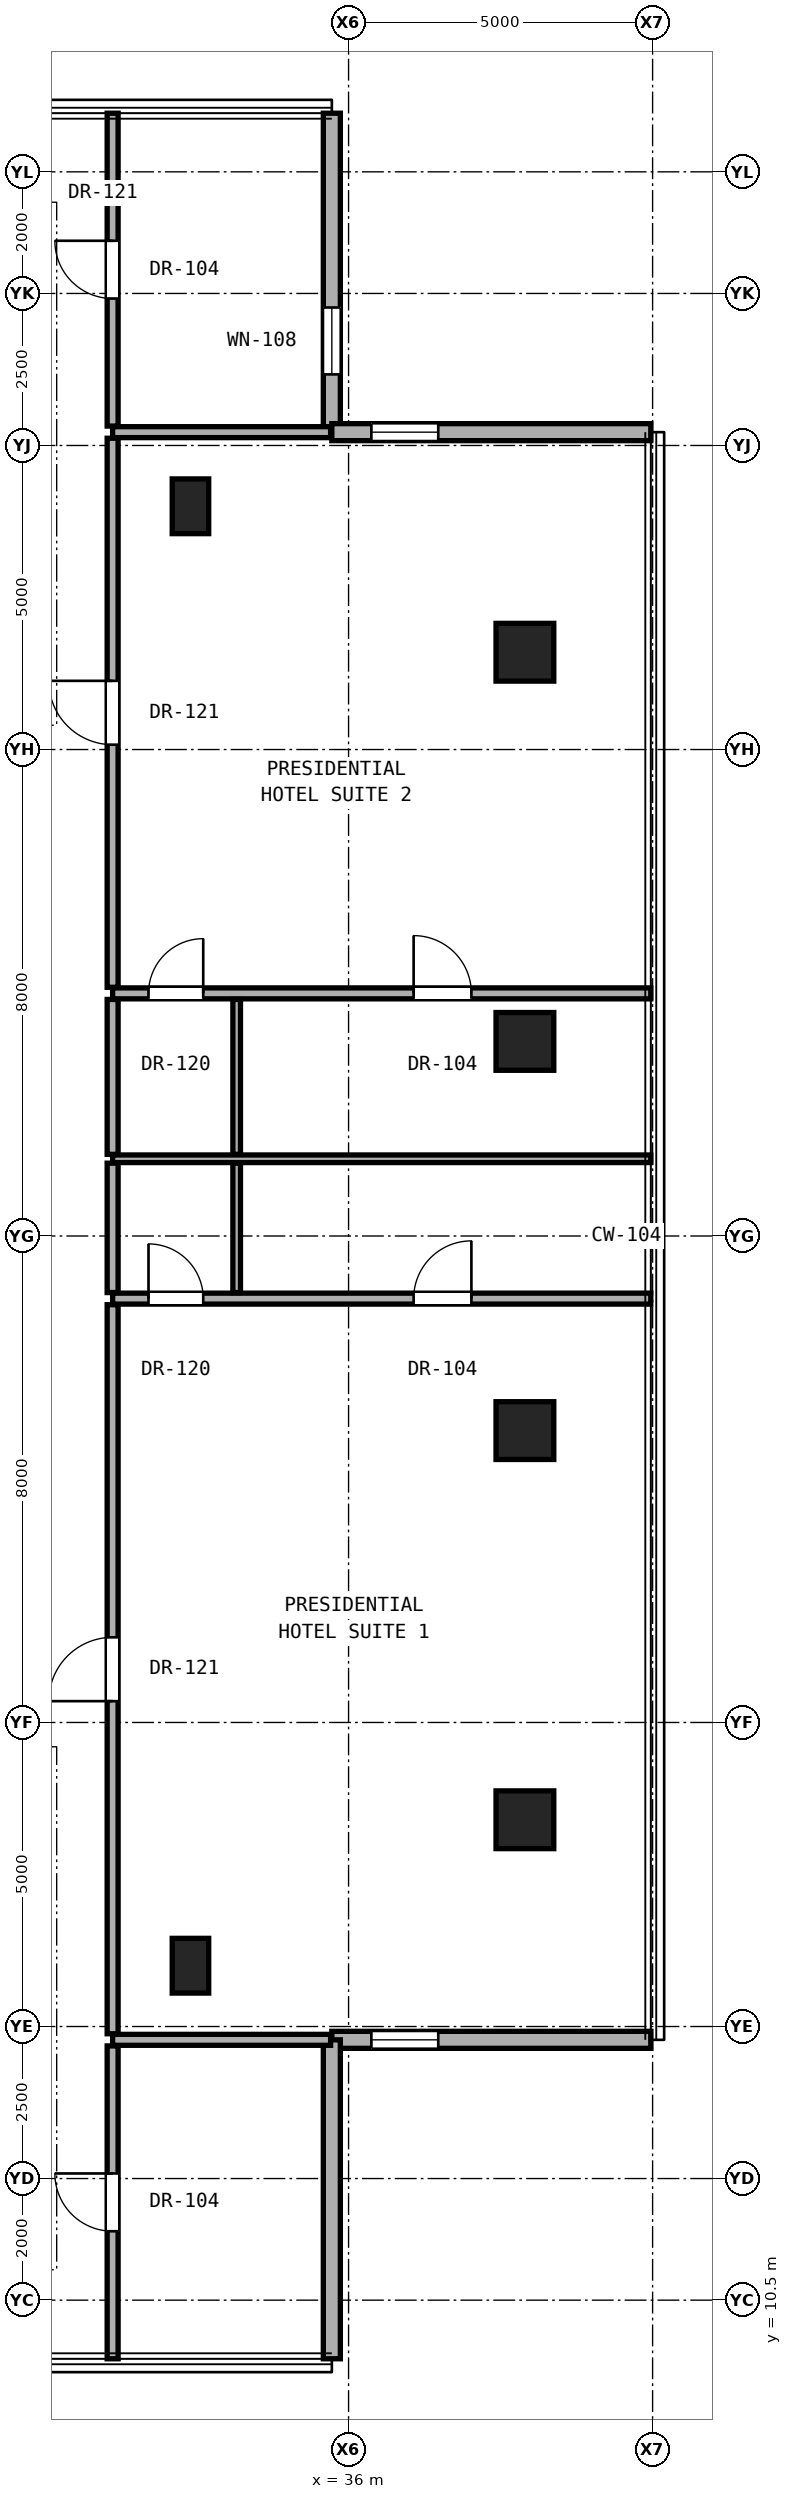
"""IFC4 building model, lengths in metres.
Left out: names, types, materials, properties, quantities, classifications, styles, units other than length and angle.
Written with IfcOpenShell. Run it as: python <this file> out.ifc"""

import sys

from ifc_helpers import new_model, si_unit, direction, frame, frame_2d, origin, origin_2d, place, context, subcontext, project, spatial, rectangle, hollow_rectangle, extrude, element, fill, save


model = new_model("IFC4")
c1 = context("Model", 3, precision=1e-05, world=origin(), true_north=direction((0.0, 1.0)))
c2 = subcontext(c1, "Body", "Model", "MODEL_VIEW")
j1 = project(units=[si_unit("LENGTHUNIT", "METRE"), si_unit("PLANEANGLEUNIT", "RADIAN")], contexts=[c1])
p1 = place(None, origin())
s1 = spatial("IfcSite", under=j1, at=p1, CompositionType="ELEMENT")
p2 = place(p1, origin())
s2 = spatial("IfcBuilding", under=s1, at=p2, CompositionType="ELEMENT")
p3 = place(p2, frame((0.0, 0.0, 164.15)))
s3 = spatial("IfcBuildingStorey", under=s2, at=p3, CompositionType="ELEMENT", Elevation=164.15)
for number, where, z_axis, x_axis in (
    (1, (38.9, 18.4, 0.0), (0.0, 0.0, 1.0), (1.0, 0.0, 0.0)),
    (2, (38.9, 24.8, 0.0), (0.0, 0.0, 1.0), (1.0, 0.0, 0.0)),
    (3, (38.9, 31.2, 0.0), (0.0, 0.0, 1.0), (1.0, 0.0, 0.0)),
    (4, (38.9, 37.6, 0.0), (0.0, 0.0, 1.0), (1.0, 0.0, 0.0)),
):
    element("IfcColumn", number, at=place(p3, frame(where, z_axis=z_axis, x_axis=x_axis)), inside=s3, PredefinedType="COLUMN", context=c2, shape_type="SweptSolid", body=[
        extrude(hollow_rectangle(XDim=0.95, YDim=0.95, WallThickness=0.05, at=origin_2d()), origin(), (0.0, 0.0, 1.0), 3.25),
    ])
for number, where, z_axis, x_axis in (
    (5, (33.4, 16.0, 0.0), (0.0, 0.0, 1.0), (1.0, 0.0, 0.0)),
    (6, (33.4, 40.0, 0.0), (0.0, 0.0, 1.0), (1.0, 0.0, 0.0)),
):
    element("IfcColumn", number, at=place(p3, frame(where, z_axis=z_axis, x_axis=x_axis)), inside=s3, PredefinedType="PILASTER", context=c2, shape_type="SweptSolid", body=[
        extrude(rectangle(XDim=0.6, YDim=0.9, at=origin_2d()), origin(), (0.0, 0.0, 1.0), 3.25),
    ])
p4 = place(p3, frame((35.725, 41.219, 0.0), z_axis=(0.0, 0.0, 1.0), x_axis=(0.0, 1.0, 0.0)))
e7 = element("IfcWall", 7, at=p4, inside=s3, PredefinedType="SOLIDWALL", context=c2, shape_type="SweptSolid", body=[
    extrude(rectangle(XDim=5.245, YDim=0.28, at=frame_2d((2.623, 0.0))), origin(), (0.0, 0.0, 1.0), 3.03),
])
p5 = place(p4, frame((0.95, 0.0, 0.85)))
e8 = element("IfcOpeningElement", 8, at=p5, cuts=e7, PredefinedType="OPENING", context=c2, shape_type="SweptSolid", body=[
    extrude(rectangle(XDim=1.1, YDim=2.0, at=frame_2d((0.55, 1.0))), frame((0.0, 0.15, 0.0), z_axis=(0.0, -1.0, 0.0), x_axis=(1.0, 0.0, 0.0)), (0.0, 0.0, 1.0), 0.3),
])
p6 = place(p3, frame((35.725, 14.781, 0.0), z_axis=(0.0, 0.0, 1.0), x_axis=(1.0, 0.0, 0.0)))
e9 = element("IfcWall", 9, at=p6, inside=s3, PredefinedType="SOLIDWALL", context=c2, shape_type="SweptSolid", body=[
    extrude(rectangle(XDim=5.245, YDim=0.28, at=frame_2d((2.623, 0.0))), origin(), (0.0, 0.0, 1.0), 3.03),
])
p7 = place(p6, frame((0.65, 0.0, 0.85)))
e10 = element("IfcOpeningElement", 10, at=p7, cuts=e9, PredefinedType="OPENING", context=c2, shape_type="SweptSolid", body=[
    extrude(rectangle(XDim=1.1, YDim=2.0, at=frame_2d((0.55, 1.0))), frame((0.0, 0.15, 0.0), z_axis=(0.0, -1.0, 0.0), x_axis=(1.0, 0.0, 0.0)), (0.0, 0.0, 1.0), 0.3),
])
p8 = place(p3, frame((35.725, 9.536, 0.0), z_axis=(0.0, 0.0, 1.0), x_axis=(0.0, 1.0, 0.0)))
e11 = element("IfcWall", 11, at=p8, inside=s3, PredefinedType="SOLIDWALL", context=c2, shape_type="SweptSolid", body=[
    extrude(rectangle(XDim=5.245, YDim=0.28, at=frame_2d((2.623, 0.0))), origin(), (0.0, 0.0, 1.0), 3.03),
])
p9 = place(p3, frame((40.97, 41.219, 0.0), z_axis=(0.0, 0.0, 1.0), x_axis=(-1.0, 0.0, 0.0)))
e12 = element("IfcWall", 12, at=p9, inside=s3, PredefinedType="SOLIDWALL", context=c2, shape_type="SweptSolid", body=[
    extrude(rectangle(XDim=5.245, YDim=0.28, at=frame_2d((2.623, 0.0))), origin(), (0.0, 0.0, 1.0), 3.03),
])
p10 = place(p9, frame((3.495, 0.0, 0.85)))
e13 = element("IfcOpeningElement", 13, at=p10, cuts=e12, PredefinedType="OPENING", context=c2, shape_type="SweptSolid", body=[
    extrude(rectangle(XDim=1.1, YDim=2.0, at=frame_2d((0.55, 1.0))), frame((0.0, 0.15, 0.0), z_axis=(0.0, -1.0, 0.0), x_axis=(1.0, 0.0, 0.0)), (0.0, 0.0, 1.0), 0.3),
])
p11 = place(p3, frame((32.12, 14.781, 0.0), z_axis=(0.0, 0.0, 1.0), x_axis=(1.0, 0.0, 0.0)))
e14 = element("IfcWall", 14, at=p11, inside=s3, PredefinedType="PARTITIONING", context=c2, shape_type="SweptSolid", body=[
    extrude(rectangle(XDim=3.585, YDim=0.18, at=frame_2d((1.792, 0.0))), origin(), (0.0, 0.0, 1.0), 3.05),
])
p12 = place(p3, frame((32.12, 26.97, 0.0), z_axis=(0.0, 0.0, 1.0), x_axis=(1.0, 0.0, 0.0)))
e15 = element("IfcWall", 15, at=p12, inside=s3, PredefinedType="PARTITIONING", context=c2, shape_type="SweptSolid", body=[
    extrude(rectangle(XDim=8.85, YDim=0.18, at=frame_2d((4.425, 0.0))), origin(), (0.0, 0.0, 1.0), 2.269),
])
p13 = place(p12, frame((4.95, 0.0, 0.0)))
e16 = element("IfcOpeningElement", 16, at=p13, cuts=e15, PredefinedType="OPENING", context=c2, shape_type="SweptSolid", body=[
    extrude(rectangle(XDim=0.95, YDim=2.15, at=frame_2d((0.475, 1.075))), frame((0.0, 0.1, 0.0), z_axis=(0.0, -1.0, 0.0), x_axis=(1.0, 0.0, 0.0)), (0.0, 0.0, 1.0), 0.2),
])
p14 = place(p12, frame((0.59, 0.0, 0.0)))
e17 = element("IfcOpeningElement", 17, at=p14, cuts=e15, PredefinedType="OPENING", context=c2, shape_type="SweptSolid", body=[
    extrude(rectangle(XDim=0.9, YDim=2.1, at=frame_2d((0.45, 1.05))), frame((0.0, 0.1, 0.0), z_axis=(0.0, -1.0, 0.0), x_axis=(1.0, 0.0, 0.0)), (0.0, 0.0, 1.0), 0.2),
])
p15 = place(p3, frame((32.12, 29.27, 0.0), z_axis=(0.0, 0.0, 1.0), x_axis=(1.0, 0.0, 0.0)))
e18 = element("IfcWall", 18, at=p15, inside=s3, PredefinedType="PARTITIONING", context=c2, shape_type="SweptSolid", body=[
    extrude(rectangle(XDim=8.85, YDim=0.125, at=frame_2d((4.425, 0.0))), origin(), (0.0, 0.0, 1.0), 2.269),
])
p16 = place(p3, frame((32.12, 31.99, 0.0), z_axis=(0.0, 0.0, 1.0), x_axis=(1.0, 0.0, 0.0)))
e19 = element("IfcWall", 19, at=p16, inside=s3, PredefinedType="PARTITIONING", context=c2, shape_type="SweptSolid", body=[
    extrude(rectangle(XDim=8.85, YDim=0.18, at=frame_2d((4.425, 0.0))), origin(), (0.0, 0.0, 1.0), 2.269),
])
p17 = place(p16, frame((4.95, 0.0, 0.0)))
e20 = element("IfcOpeningElement", 20, at=p17, cuts=e19, PredefinedType="OPENING", context=c2, shape_type="SweptSolid", body=[
    extrude(rectangle(XDim=0.95, YDim=2.15, at=frame_2d((0.475, 1.075))), frame((0.0, 0.1, 0.0), z_axis=(0.0, -1.0, 0.0), x_axis=(1.0, 0.0, 0.0)), (0.0, 0.0, 1.0), 0.2),
])
p18 = place(p16, frame((0.59, 0.0, 0.0)))
e21 = element("IfcOpeningElement", 21, at=p18, cuts=e19, PredefinedType="OPENING", context=c2, shape_type="SweptSolid", body=[
    extrude(rectangle(XDim=0.9, YDim=2.1, at=frame_2d((0.45, 1.05))), frame((0.0, 0.1, 0.0), z_axis=(0.0, -1.0, 0.0), x_axis=(1.0, 0.0, 0.0)), (0.0, 0.0, 1.0), 0.2),
])
p19 = place(p3, frame((32.12, 41.219, 0.0), z_axis=(0.0, 0.0, 1.0), x_axis=(1.0, 0.0, 0.0)))
e22 = element("IfcWall", 22, at=p19, inside=s3, PredefinedType="PARTITIONING", context=c2, shape_type="SweptSolid", body=[
    extrude(rectangle(XDim=3.585, YDim=0.18, at=frame_2d((1.792, 0.0))), origin(), (0.0, 0.0, 1.0), 3.05),
])
p20 = place(p3, frame((32.12, 9.536, 0.0), z_axis=(0.0, 0.0, 1.0), x_axis=(0.0, 1.0, 0.0)))
e23 = element("IfcWall", 23, at=p20, inside=s3, PredefinedType="PARTITIONING", context=c2, shape_type="SweptSolid", body=[
    extrude(rectangle(XDim=5.145, YDim=0.18, at=frame_2d((2.573, 0.0))), origin(), (0.0, 0.0, 1.0), 3.05),
])
p21 = place(p20, frame((2.097, 0.0, 0.0)))
e24 = element("IfcOpeningElement", 24, at=p21, cuts=e23, PredefinedType="OPENING", context=c2, shape_type="SweptSolid", body=[
    extrude(rectangle(XDim=0.95, YDim=2.15, at=frame_2d((0.475, 1.075))), frame((0.0, 0.1, 0.0), z_axis=(0.0, -1.0, 0.0), x_axis=(1.0, 0.0, 0.0)), (0.0, 0.0, 1.0), 0.2),
])
p22 = place(p3, frame((32.12, 14.881, 0.0), z_axis=(0.0, 0.0, 1.0), x_axis=(0.0, 1.0, 0.0)))
e25 = element("IfcWall", 25, at=p22, inside=s3, PredefinedType="PARTITIONING", context=c2, shape_type="SweptSolid", body=[
    extrude(rectangle(XDim=11.989, YDim=0.18, at=frame_2d((5.995, 0.0))), origin(), (0.0, 0.0, 1.0), 2.346),
])
p23 = place(p22, frame((5.469, 0.0, 0.0)))
e26 = element("IfcOpeningElement", 26, at=p23, cuts=e25, PredefinedType="OPENING", context=c2, shape_type="SweptSolid", body=[
    extrude(rectangle(XDim=1.05, YDim=2.2, at=frame_2d((0.525, 1.1))), frame((0.0, 0.1, 0.0), z_axis=(0.0, -1.0, 0.0), x_axis=(1.0, 0.0, 0.0)), (0.0, 0.0, 1.0), 0.2),
])
p24 = place(p3, frame((32.12, 27.07, 0.0), z_axis=(0.0, 0.0, 1.0), x_axis=(0.0, 1.0, 0.0)))
e27 = element("IfcWall", 27, at=p24, inside=s3, PredefinedType="PARTITIONING", context=c2, shape_type="SweptSolid", body=[
    extrude(rectangle(XDim=2.127, YDim=0.18, at=frame_2d((1.064, 0.0))), origin(), (0.0, 0.0, 1.0), 3.05),
])
p25 = place(p3, frame((32.12, 29.343, 0.0), z_axis=(0.0, 0.0, 1.0), x_axis=(0.0, 1.0, 0.0)))
e28 = element("IfcWall", 28, at=p25, inside=s3, PredefinedType="PARTITIONING", context=c2, shape_type="SweptSolid", body=[
    extrude(rectangle(XDim=2.547, YDim=0.18, at=frame_2d((1.274, 0.0))), origin(), (0.0, 0.0, 1.0), 2.346),
])
p26 = place(p3, frame((32.12, 32.09, 0.0), z_axis=(0.0, 0.0, 1.0), x_axis=(0.0, 1.0, 0.0)))
e29 = element("IfcWall", 29, at=p26, inside=s3, PredefinedType="PARTITIONING", context=c2, shape_type="SweptSolid", body=[
    extrude(rectangle(XDim=9.029, YDim=0.18, at=frame_2d((4.514, 0.0))), origin(), (0.0, 0.0, 1.0), 2.442),
])
p27 = place(p26, frame((3.99, 0.0, 0.0)))
e30 = element("IfcOpeningElement", 30, at=p27, cuts=e29, PredefinedType="OPENING", context=c2, shape_type="SweptSolid", body=[
    extrude(rectangle(XDim=1.05, YDim=2.2, at=frame_2d((0.525, 1.1))), frame((0.0, 0.1, 0.0), z_axis=(0.0, -1.0, 0.0), x_axis=(1.0, 0.0, 0.0)), (0.0, 0.0, 1.0), 0.2),
])
p28 = place(p3, frame((32.12, 41.319, 0.0), z_axis=(0.0, 0.0, 1.0), x_axis=(0.0, 1.0, 0.0)))
e31 = element("IfcWall", 31, at=p28, inside=s3, PredefinedType="PARTITIONING", context=c2, shape_type="SweptSolid", body=[
    extrude(rectangle(XDim=5.145, YDim=0.18, at=frame_2d((2.573, 0.0))), origin(), (0.0, 0.0, 1.0), 3.05),
])
p29 = place(p28, frame((2.097, 0.0, 0.0)))
e32 = element("IfcOpeningElement", 32, at=p29, cuts=e31, PredefinedType="OPENING", context=c2, shape_type="SweptSolid", body=[
    extrude(rectangle(XDim=0.95, YDim=2.15, at=frame_2d((0.475, 1.075))), frame((0.0, 0.1, 0.0), z_axis=(0.0, -1.0, 0.0), x_axis=(1.0, 0.0, 0.0)), (0.0, 0.0, 1.0), 0.2),
])
p30 = place(p3, frame((34.16, 27.07, 0.0), z_axis=(0.0, 0.0, 1.0), x_axis=(0.0, 1.0, 0.0)))
e33 = element("IfcWall", 33, at=p30, inside=s3, PredefinedType="PARTITIONING", context=c2, shape_type="SweptSolid", body=[
    extrude(rectangle(XDim=2.127, YDim=0.125, at=frame_2d((1.064, 0.0))), origin(), (0.0, 0.0, 1.0), 3.05),
])
p31 = place(p3, frame((34.16, 29.343, 0.0), z_axis=(0.0, 0.0, 1.0), x_axis=(0.0, 1.0, 0.0)))
e34 = element("IfcWall", 34, at=p31, inside=s3, PredefinedType="PARTITIONING", context=c2, shape_type="SweptSolid", body=[
    extrude(rectangle(XDim=2.547, YDim=0.125, at=frame_2d((1.274, 0.0))), origin(), (0.0, 0.0, 1.0), 2.346),
])
p32 = place(p5, origin())
e35 = element("IfcWindow", 35, at=p32, inside=s3, PartitioningType="SINGLE_PANEL", PredefinedType="WINDOW", context=c2, shape_type="SweptSolid", body=[
    extrude(rectangle(XDim=1.1, YDim=2.0, at=frame_2d((0.55, 1.0))), frame((0.0, 0.03, 0.0), z_axis=(0.0, -1.0, 0.0), x_axis=(1.0, 0.0, 0.0)), (0.0, 0.0, 1.0), 0.06),
])
fill(e8, e35)
p33 = place(p7, origin())
e36 = element("IfcWindow", 36, at=p33, inside=s3, PartitioningType="SINGLE_PANEL", PredefinedType="WINDOW", context=c2, shape_type="SweptSolid", body=[
    extrude(rectangle(XDim=1.1, YDim=2.0, at=frame_2d((0.55, 1.0))), frame((0.0, 0.03, 0.0), z_axis=(0.0, -1.0, 0.0), x_axis=(1.0, 0.0, 0.0)), (0.0, 0.0, 1.0), 0.06),
])
fill(e10, e36)
p34 = place(p10, origin())
e37 = element("IfcWindow", 37, at=p34, inside=s3, PartitioningType="SINGLE_PANEL", PredefinedType="WINDOW", context=c2, shape_type="SweptSolid", body=[
    extrude(rectangle(XDim=1.1, YDim=2.0, at=frame_2d((0.55, 1.0))), frame((0.0, 0.03, 0.0), z_axis=(0.0, -1.0, 0.0), x_axis=(1.0, 0.0, 0.0)), (0.0, 0.0, 1.0), 0.06),
])
fill(e13, e37)
p35 = place(p23, origin())
e38 = element("IfcDoor", 38, at=p35, inside=s3, OperationType="SINGLE_SWING_LEFT", PredefinedType="DOOR", context=c2, shape_type="SweptSolid", body=[
    extrude(rectangle(XDim=1.05, YDim=2.2, at=frame_2d((0.525, 1.1))), frame((0.0, 0.025, 0.0), z_axis=(0.0, -1.0, 0.0), x_axis=(1.0, 0.0, 0.0)), (0.0, 0.0, 1.0), 0.05),
])
fill(e26, e38)
p36 = place(p13, origin())
e39 = element("IfcDoor", 39, at=p36, inside=s3, OperationType="SINGLE_SWING_RIGHT", PredefinedType="DOOR", context=c2, shape_type="SweptSolid", body=[
    extrude(rectangle(XDim=0.95, YDim=2.15, at=frame_2d((0.475, 1.075))), frame((0.0, 0.025, 0.0), z_axis=(0.0, -1.0, 0.0), x_axis=(1.0, 0.0, 0.0)), (0.0, 0.0, 1.0), 0.05),
])
fill(e16, e39)
p37 = place(p14, origin())
e40 = element("IfcDoor", 40, at=p37, inside=s3, OperationType="SINGLE_SWING_LEFT", PredefinedType="DOOR", context=c2, shape_type="SweptSolid", body=[
    extrude(rectangle(XDim=0.9, YDim=2.1, at=frame_2d((0.45, 1.05))), frame((0.0, 0.025, 0.0), z_axis=(0.0, -1.0, 0.0), x_axis=(1.0, 0.0, 0.0)), (0.0, 0.0, 1.0), 0.05),
])
fill(e17, e40)
p38 = place(p27, origin())
e41 = element("IfcDoor", 41, at=p38, inside=s3, OperationType="SINGLE_SWING_RIGHT", PredefinedType="DOOR", context=c2, shape_type="SweptSolid", body=[
    extrude(rectangle(XDim=1.05, YDim=2.2, at=frame_2d((0.525, 1.1))), frame((0.0, 0.025, 0.0), z_axis=(0.0, -1.0, 0.0), x_axis=(1.0, 0.0, 0.0)), (0.0, 0.0, 1.0), 0.05),
])
fill(e30, e41)
p39 = place(p17, origin())
e42 = element("IfcDoor", 42, at=p39, inside=s3, OperationType="SINGLE_SWING_LEFT", PredefinedType="DOOR", context=c2, shape_type="SweptSolid", body=[
    extrude(rectangle(XDim=0.95, YDim=2.15, at=frame_2d((0.475, 1.075))), frame((0.0, 0.025, 0.0), z_axis=(0.0, -1.0, 0.0), x_axis=(1.0, 0.0, 0.0)), (0.0, 0.0, 1.0), 0.05),
])
fill(e20, e42)
p40 = place(p18, origin())
e43 = element("IfcDoor", 43, at=p40, inside=s3, OperationType="SINGLE_SWING_RIGHT", PredefinedType="DOOR", context=c2, shape_type="SweptSolid", body=[
    extrude(rectangle(XDim=0.9, YDim=2.1, at=frame_2d((0.45, 1.05))), frame((0.0, 0.025, 0.0), z_axis=(0.0, -1.0, 0.0), x_axis=(1.0, 0.0, 0.0)), (0.0, 0.0, 1.0), 0.05),
])
fill(e21, e43)
p41 = place(p21, origin())
e44 = element("IfcDoor", 44, at=p41, inside=s3, OperationType="SINGLE_SWING_RIGHT", PredefinedType="DOOR", context=c2, shape_type="SweptSolid", body=[
    extrude(rectangle(XDim=0.95, YDim=2.15, at=frame_2d((0.475, 1.075))), frame((0.0, 0.025, 0.0), z_axis=(0.0, -1.0, 0.0), x_axis=(1.0, 0.0, 0.0)), (0.0, 0.0, 1.0), 0.05),
])
fill(e24, e44)
p42 = place(p29, origin())
e45 = element("IfcDoor", 45, at=p42, inside=s3, OperationType="SINGLE_SWING_RIGHT", PredefinedType="DOOR", context=c2, shape_type="SweptSolid", body=[
    extrude(rectangle(XDim=0.95, YDim=2.15, at=frame_2d((0.475, 1.075))), frame((0.0, 0.025, 0.0), z_axis=(0.0, -1.0, 0.0), x_axis=(1.0, 0.0, 0.0)), (0.0, 0.0, 1.0), 0.05),
])
fill(e32, e45)
save(model, sys.argv[1])
